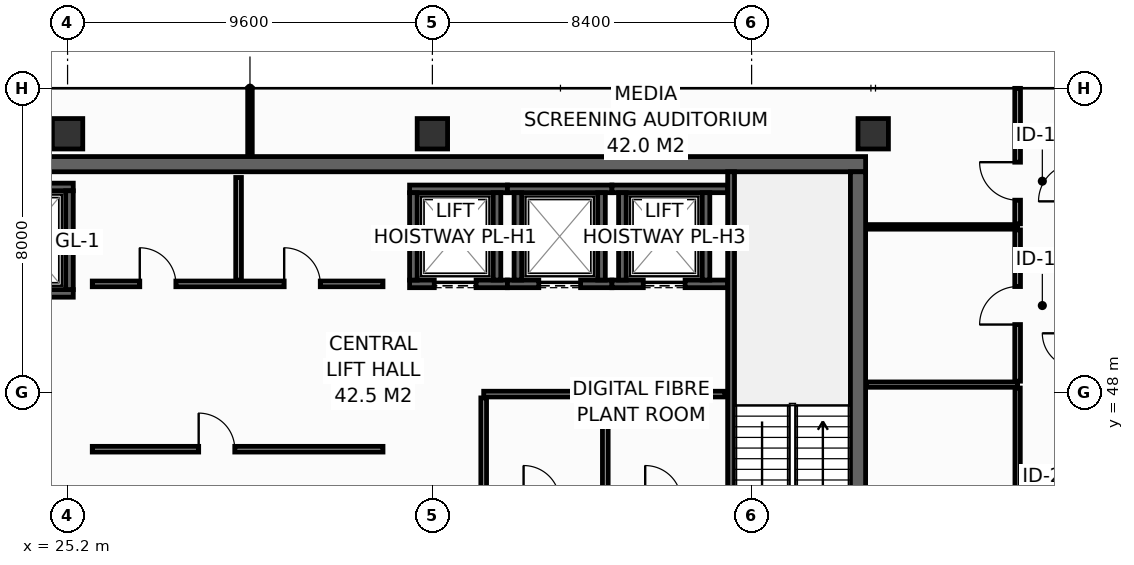
"""IFC4 building model, lengths in metres.
Left out: names, types, materials, properties, quantities, classifications, styles, units other than length and angle.
Written with IfcOpenShell. Run it as: python <this file> out.ifc"""

import sys

from ifc_helpers import new_model, si_unit, direction, frame, frame_2d, origin, origin_2d, place, context, subcontext, project, spatial, rectangle, hollow_rectangle, extrude, element, fill, save


model = new_model("IFC4")
c1 = context("Model", 3, precision=1e-05, world=origin(), true_north=direction((0.0, 1.0)))
c2 = subcontext(c1, "Body", "Model", "MODEL_VIEW")
j1 = project(units=[si_unit("LENGTHUNIT", "METRE"), si_unit("PLANEANGLEUNIT", "RADIAN")], contexts=[c1])
p1 = place(None, origin())
s1 = spatial("IfcSite", under=j1, at=p1, CompositionType="ELEMENT")
p2 = place(p1, origin())
s2 = spatial("IfcBuilding", under=s1, at=p2, CompositionType="ELEMENT")
p3 = place(p2, frame((0.0, 0.0, 230.6)))
s3 = spatial("IfcBuildingStorey", under=s2, at=p3, CompositionType="ELEMENT", Elevation=230.6)
p4 = place(p3, frame((13.7, 54.0, 0.0), z_axis=(0.0, 0.0, 1.0), x_axis=(1.0, 0.0, 0.0)))
e1 = element("IfcWall", 1, at=p4, inside=s3, PredefinedType="SHEAR", context=c2, shape_type="SweptSolid", body=[
    extrude(rectangle(XDim=32.5, YDim=0.4, at=frame_2d((16.25, 0.0))), origin(), (0.0, 0.0, 1.0), 3.55),
])
p5 = place(p3, frame((46.0, 43.4, 0.0), z_axis=(0.0, 0.0, 1.0), x_axis=(0.0, 1.0, 0.0)))
e2 = element("IfcWall", 2, at=p5, inside=s3, PredefinedType="SHEAR", context=c2, shape_type="SweptSolid", body=[
    extrude(rectangle(XDim=10.4, YDim=0.4, at=frame_2d((5.2, 0.0))), origin(), (0.0, 0.0, 1.0), 3.55),
])
for number, where, z_axis, x_axis in (
    (3, (25.2, 54.8, 0.0), (0.0, 0.0, 1.0), (1.0, 0.0, 0.0)),
    (4, (34.8, 54.8, 0.0), (0.0, 0.0, 1.0), (1.0, 0.0, 0.0)),
    (5, (46.4, 54.8, 0.0), (0.0, 0.0, 1.0), (1.0, 0.0, 0.0)),
):
    element("IfcColumn", number, at=place(p3, frame(where, z_axis=z_axis, x_axis=x_axis)), inside=s3, PredefinedType="COLUMN", context=c2, shape_type="SweptSolid", body=[
        extrude(hollow_rectangle(XDim=0.8, YDim=0.8, WallThickness=0.036, at=origin_2d()), origin(), (0.0, 0.0, 1.0), 3.8),
    ])
p6 = place(p3, frame((22.5, 50.6, 0.0), z_axis=(0.0, 0.0, 1.0), x_axis=(1.0, 0.0, 0.0)))
e6 = element("IfcWall", 6, at=p6, inside=s3, PredefinedType="SHEAR", context=c2, shape_type="SweptSolid", body=[
    extrude(rectangle(XDim=2.85, YDim=0.2, at=frame_2d((1.425, 0.0))), origin(), (0.0, 0.0, 1.0), 3.55),
])
p7 = place(p6, frame((0.925, 0.0, 0.0)))
e7 = element("IfcOpeningElement", 7, at=p7, cuts=e6, PredefinedType="OPENING", context=c2, shape_type="SweptSolid", body=[
    extrude(rectangle(XDim=1.25, YDim=2.3, at=frame_2d((0.625, 1.15))), frame((0.0, 0.11, 0.0), z_axis=(0.0, -1.0, 0.0), x_axis=(1.0, 0.0, 0.0)), (0.0, 0.0, 1.0), 0.22),
])
p8 = place(p3, frame((22.5, 53.4, 0.0), z_axis=(0.0, 0.0, 1.0), x_axis=(1.0, 0.0, 0.0)))
e8 = element("IfcWall", 8, at=p8, inside=s3, PredefinedType="SHEAR", context=c2, shape_type="SweptSolid", body=[
    extrude(rectangle(XDim=2.85, YDim=0.2, at=frame_2d((1.425, 0.0))), origin(), (0.0, 0.0, 1.0), 3.55),
])
p9 = place(p3, frame((25.25, 50.7, 0.0), z_axis=(0.0, 0.0, 1.0), x_axis=(0.0, 1.0, 0.0)))
e9 = element("IfcWall", 9, at=p9, inside=s3, PredefinedType="SHEAR", context=c2, shape_type="SweptSolid", body=[
    extrude(rectangle(XDim=2.6, YDim=0.2, at=frame_2d((1.3, 0.0))), origin(), (0.0, 0.0, 1.0), 3.55),
])
p10 = place(p3, frame((34.2, 50.85, 0.0), z_axis=(0.0, 0.0, 1.0), x_axis=(1.0, 0.0, 0.0)))
e10 = element("IfcWall", 10, at=p10, inside=s3, PredefinedType="SHEAR", context=c2, shape_type="SweptSolid", body=[
    extrude(rectangle(XDim=2.575, YDim=0.2, at=frame_2d((1.288, 0.0))), origin(), (0.0, 0.0, 1.0), 3.55),
])
p11 = place(p10, frame((0.65, 0.0, 0.0)))
e11 = element("IfcOpeningElement", 11, at=p11, cuts=e10, PredefinedType="OPENING", context=c2, shape_type="SweptSolid", body=[
    extrude(rectangle(XDim=1.1, YDim=2.2, at=frame_2d((0.55, 1.1))), frame((0.0, 0.11, 0.0), z_axis=(0.0, -1.0, 0.0), x_axis=(1.0, 0.0, 0.0)), (0.0, 0.0, 1.0), 0.22),
])
p12 = place(p3, frame((34.2, 53.35, 0.0), z_axis=(0.0, 0.0, 1.0), x_axis=(1.0, 0.0, 0.0)))
e12 = element("IfcWall", 12, at=p12, inside=s3, PredefinedType="SHEAR", context=c2, shape_type="SweptSolid", body=[
    extrude(rectangle(XDim=2.575, YDim=0.2, at=frame_2d((1.288, 0.0))), origin(), (0.0, 0.0, 1.0), 3.55),
])
for number, where, z_axis, x_axis in (
    (13, (34.3, 50.95, 0.0), (0.0, 0.0, 1.0), (0.0, 1.0, 0.0)),
    (14, (36.5, 50.95, 0.0), (0.0, 0.0, 1.0), (0.0, 1.0, 0.0)),
):
    element("IfcWall", number, at=place(p3, frame(where, z_axis=z_axis, x_axis=x_axis)), inside=s3, PredefinedType="SHEAR", context=c2, shape_type="SweptSolid", body=[
        extrude(rectangle(XDim=2.3, YDim=0.2, at=frame_2d((1.15, 0.0))), origin(), (0.0, 0.0, 1.0), 3.55),
    ])
p13 = place(p3, frame((36.775, 50.85, 0.0), z_axis=(0.0, 0.0, 1.0), x_axis=(1.0, 0.0, 0.0)))
e15 = element("IfcWall", 15, at=p13, inside=s3, PredefinedType="SHEAR", context=c2, shape_type="SweptSolid", body=[
    extrude(rectangle(XDim=2.75, YDim=0.2, at=frame_2d((1.375, 0.0))), origin(), (0.0, 0.0, 1.0), 3.55),
])
p14 = place(p13, frame((0.825, 0.0, 0.0)))
e16 = element("IfcOpeningElement", 16, at=p14, cuts=e15, PredefinedType="OPENING", context=c2, shape_type="SweptSolid", body=[
    extrude(rectangle(XDim=1.1, YDim=2.2, at=frame_2d((0.55, 1.1))), frame((0.0, 0.11, 0.0), z_axis=(0.0, -1.0, 0.0), x_axis=(1.0, 0.0, 0.0)), (0.0, 0.0, 1.0), 0.22),
])
p15 = place(p3, frame((36.775, 53.35, 0.0), z_axis=(0.0, 0.0, 1.0), x_axis=(1.0, 0.0, 0.0)))
e17 = element("IfcWall", 17, at=p15, inside=s3, PredefinedType="SHEAR", context=c2, shape_type="SweptSolid", body=[
    extrude(rectangle(XDim=2.75, YDim=0.2, at=frame_2d((1.375, 0.0))), origin(), (0.0, 0.0, 1.0), 3.55),
])
for number, where, z_axis, x_axis in (
    (18, (37.05, 50.95, 0.0), (0.0, 0.0, 1.0), (0.0, 1.0, 0.0)),
    (19, (39.25, 50.95, 0.0), (0.0, 0.0, 1.0), (0.0, 1.0, 0.0)),
):
    element("IfcWall", number, at=place(p3, frame(where, z_axis=z_axis, x_axis=x_axis)), inside=s3, PredefinedType="SHEAR", context=c2, shape_type="SweptSolid", body=[
        extrude(rectangle(XDim=2.3, YDim=0.2, at=frame_2d((1.15, 0.0))), origin(), (0.0, 0.0, 1.0), 3.55),
    ])
p16 = place(p3, frame((39.525, 50.85, 0.0), z_axis=(0.0, 0.0, 1.0), x_axis=(1.0, 0.0, 0.0)))
e20 = element("IfcWall", 20, at=p16, inside=s3, PredefinedType="SHEAR", context=c2, shape_type="SweptSolid", body=[
    extrude(rectangle(XDim=3.045, YDim=0.2, at=frame_2d((1.522, 0.0))), origin(), (0.0, 0.0, 1.0), 3.55),
])
p17 = place(p16, frame((0.825, 0.0, 0.0)))
e21 = element("IfcOpeningElement", 21, at=p17, cuts=e20, PredefinedType="OPENING", context=c2, shape_type="SweptSolid", body=[
    extrude(rectangle(XDim=1.1, YDim=2.2, at=frame_2d((0.55, 1.1))), frame((0.0, 0.11, 0.0), z_axis=(0.0, -1.0, 0.0), x_axis=(1.0, 0.0, 0.0)), (0.0, 0.0, 1.0), 0.22),
])
p18 = place(p3, frame((39.525, 53.35, 0.0), z_axis=(0.0, 0.0, 1.0), x_axis=(1.0, 0.0, 0.0)))
e22 = element("IfcWall", 22, at=p18, inside=s3, PredefinedType="SHEAR", context=c2, shape_type="SweptSolid", body=[
    extrude(rectangle(XDim=3.045, YDim=0.2, at=frame_2d((1.522, 0.0))), origin(), (0.0, 0.0, 1.0), 3.55),
])
for number, where, z_axis, x_axis in (
    (23, (39.8, 50.95, 0.0), (0.0, 0.0, 1.0), (0.0, 1.0, 0.0)),
    (24, (42.0, 50.95, 0.0), (0.0, 0.0, 1.0), (0.0, 1.0, 0.0)),
):
    element("IfcWall", number, at=place(p3, frame(where, z_axis=z_axis, x_axis=x_axis)), inside=s3, PredefinedType="SHEAR", context=c2, shape_type="SweptSolid", body=[
        extrude(rectangle(XDim=2.3, YDim=0.2, at=frame_2d((1.15, 0.0))), origin(), (0.0, 0.0, 1.0), 3.55),
    ])
p19 = place(p3, frame((42.66, 53.8, 0.0), z_axis=(0.0, 0.0, 1.0), x_axis=(0.0, -1.0, 0.0)))
e25 = element("IfcWall", 25, at=p19, inside=s3, PredefinedType="SHEAR", context=c2, shape_type="SweptSolid", body=[
    extrude(rectangle(XDim=10.4, YDim=0.18, at=frame_2d((5.2, 0.0))), origin(), (0.0, 0.0, 1.0), 3.55),
])
p20 = place(p19, frame((8.99, 0.0, 0.0)))
e26 = element("IfcOpeningElement", 26, at=p20, cuts=e25, PredefinedType="OPENING", context=c2, shape_type="SweptSolid", body=[
    extrude(rectangle(XDim=1.1, YDim=2.15, at=frame_2d((0.55, 1.075))), frame((0.0, 0.1, 0.0), z_axis=(0.0, -1.0, 0.0), x_axis=(1.0, 0.0, 0.0)), (0.0, 0.0, 1.0), 0.2),
])
p21 = place(p3, frame((36.15, 47.95, 0.0), z_axis=(0.0, 0.0, 1.0), x_axis=(1.0, 0.0, 0.0)))
e27 = element("IfcWall", 27, at=p21, inside=s3, PredefinedType="PARTITIONING", context=c2, shape_type="SweptSolid", body=[
    extrude(rectangle(XDim=6.35, YDim=0.15, at=frame_2d((3.175, 0.0))), origin(), (0.0, 0.0, 1.0), 3.55),
])
for number, where, z_axis, x_axis in (
    (28, (36.15, 45.22, 0.0), (0.0, 0.0, 1.0), (0.0, 1.0, 0.0)),
    (29, (39.35, 45.22, 0.0), (0.0, 0.0, 1.0), (0.0, 1.0, 0.0)),
):
    element("IfcWall", number, at=place(p3, frame(where, z_axis=z_axis, x_axis=x_axis)), inside=s3, PredefinedType="PARTITIONING", context=c2, shape_type="SweptSolid", body=[
        extrude(rectangle(XDim=2.63, YDim=0.15, at=frame_2d((1.315, 0.0))), origin(), (0.0, 0.0, 1.0), 3.55),
    ])
p22 = place(p3, frame((25.85, 50.85, 0.0), z_axis=(0.0, 0.0, 1.0), x_axis=(1.0, 0.0, 0.0)))
e30 = element("IfcWall", 30, at=p22, inside=s3, PredefinedType="PARTITIONING", context=c2, shape_type="SweptSolid", body=[
    extrude(rectangle(XDim=7.65, YDim=0.15, at=frame_2d((3.825, 0.0))), origin(), (0.0, 0.0, 1.0), 3.55),
])
p23 = place(p22, frame((1.25, 0.0, 0.0)))
e31 = element("IfcOpeningElement", 31, at=p23, cuts=e30, PredefinedType="OPENING", context=c2, shape_type="SweptSolid", body=[
    extrude(rectangle(XDim=0.95, YDim=2.15, at=frame_2d((0.475, 1.075))), frame((0.0, 0.085, 0.0), z_axis=(0.0, -1.0, 0.0), x_axis=(1.0, 0.0, 0.0)), (0.0, 0.0, 1.0), 0.17),
])
p24 = place(p22, frame((5.05, 0.0, 0.0)))
e32 = element("IfcOpeningElement", 32, at=p24, cuts=e30, PredefinedType="OPENING", context=c2, shape_type="SweptSolid", body=[
    extrude(rectangle(XDim=0.95, YDim=2.15, at=frame_2d((0.475, 1.075))), frame((0.0, 0.085, 0.0), z_axis=(0.0, -1.0, 0.0), x_axis=(1.0, 0.0, 0.0)), (0.0, 0.0, 1.0), 0.17),
])
p25 = place(p3, frame((29.7, 50.95, 0.0), z_axis=(0.0, 0.0, 1.0), x_axis=(0.0, 1.0, 0.0)))
e33 = element("IfcWall", 33, at=p25, inside=s3, PredefinedType="PARTITIONING", context=c2, shape_type="SweptSolid", body=[
    extrude(rectangle(XDim=2.7, YDim=0.15, at=frame_2d((1.35, 0.0))), origin(), (0.0, 0.0, 1.0), 3.55),
])
p26 = place(p3, frame((25.85, 46.5, 0.0), z_axis=(0.0, 0.0, 1.0), x_axis=(1.0, 0.0, 0.0)))
e34 = element("IfcWall", 34, at=p26, inside=s3, PredefinedType="PARTITIONING", context=c2, shape_type="SweptSolid", body=[
    extrude(rectangle(XDim=7.65, YDim=0.15, at=frame_2d((3.825, 0.0))), origin(), (0.0, 0.0, 1.0), 3.55),
])
p27 = place(p26, frame((2.8, 0.0, 0.0)))
e35 = element("IfcOpeningElement", 35, at=p27, cuts=e34, PredefinedType="OPENING", context=c2, shape_type="SweptSolid", body=[
    extrude(rectangle(XDim=0.95, YDim=2.15, at=frame_2d((0.475, 1.075))), frame((0.0, 0.085, 0.0), z_axis=(0.0, -1.0, 0.0), x_axis=(1.0, 0.0, 0.0)), (0.0, 0.0, 1.0), 0.17),
])
p28 = place(p3, frame((46.22, 48.2, 0.0), z_axis=(0.0, 0.0, 1.0), x_axis=(1.0, 0.0, 0.0)))
e36 = element("IfcWall", 36, at=p28, inside=s3, PredefinedType="PARTITIONING", context=c2, shape_type="SweptSolid", body=[
    extrude(rectangle(XDim=3.98, YDim=0.14, at=frame_2d((1.99, 0.0))), origin(), (0.0, 0.0, 1.0), 3.55),
])
p29 = place(p3, frame((50.2, 41.04, 0.0), z_axis=(0.0, 0.0, 1.0), x_axis=(0.0, 1.0, 0.0)))
e37 = element("IfcWall", 37, at=p29, inside=s3, PredefinedType="PARTITIONING", context=c2, shape_type="SweptSolid", body=[
    extrude(rectangle(XDim=7.07, YDim=0.14, at=frame_2d((3.535, 0.0))), origin(), (0.0, 0.0, 1.0), 2.947),
])
p30 = place(p29, frame((3.085, 0.0, 0.0)))
e38 = element("IfcOpeningElement", 38, at=p30, cuts=e37, PredefinedType="OPENING", context=c2, shape_type="SweptSolid", body=[
    extrude(rectangle(XDim=0.9, YDim=2.1, at=frame_2d((0.45, 1.05))), frame((0.0, 0.08, 0.0), z_axis=(0.0, -1.0, 0.0), x_axis=(1.0, 0.0, 0.0)), (0.0, 0.0, 1.0), 0.16),
])
p31 = place(p3, frame((46.22, 52.35, 0.0), z_axis=(0.0, 0.0, 1.0), x_axis=(1.0, 0.0, 0.0)))
e39 = element("IfcWall", 39, at=p31, inside=s3, PredefinedType="PARTITIONING", context=c2, shape_type="SweptSolid", body=[
    extrude(rectangle(XDim=3.98, YDim=0.12, at=frame_2d((1.99, 0.0))), origin(), (0.0, 0.0, 1.0), 3.55),
])
p32 = place(p3, frame((30.0, 54.22, 0.0), z_axis=(0.0, 0.0, 1.0), x_axis=(0.0, 1.0, 0.0)))
e40 = element("IfcWall", 40, at=p32, inside=s3, PredefinedType="PARTITIONING", context=c2, shape_type="SweptSolid", body=[
    extrude(rectangle(XDim=1.775, YDim=0.12, at=frame_2d((0.888, 0.0))), origin(), (0.0, 0.0, 1.0), 2.935),
])
p33 = place(p3, frame((50.2, 48.29, 0.0), z_axis=(0.0, 0.0, 1.0), x_axis=(0.0, 1.0, 0.0)))
e41 = element("IfcWall", 41, at=p33, inside=s3, PredefinedType="PARTITIONING", context=c2, shape_type="SweptSolid", body=[
    extrude(rectangle(XDim=3.98, YDim=0.15, at=frame_2d((1.99, 0.0))), origin(), (0.0, 0.0, 1.0), 3.55),
])
p34 = place(p33, frame((1.49, 0.0, 0.0)))
e42 = element("IfcOpeningElement", 42, at=p34, cuts=e41, PredefinedType="OPENING", context=c2, shape_type="SweptSolid", body=[
    extrude(rectangle(XDim=1.0, YDim=2.15, at=frame_2d((0.5, 1.075))), frame((0.0, 0.085, 0.0), z_axis=(0.0, -1.0, 0.0), x_axis=(1.0, 0.0, 0.0)), (0.0, 0.0, 1.0), 0.17),
])
p35 = place(p3, frame((50.2, 52.43, 0.0), z_axis=(0.0, 0.0, 1.0), x_axis=(0.0, 1.0, 0.0)))
e43 = element("IfcWall", 43, at=p35, inside=s3, PredefinedType="PARTITIONING", context=c2, shape_type="SweptSolid", body=[
    extrude(rectangle(XDim=3.565, YDim=0.15, at=frame_2d((1.783, 0.0))), origin(), (0.0, 0.0, 1.0), 2.935),
])
p36 = place(p35, frame((0.622, 0.0, 0.0)))
e44 = element("IfcOpeningElement", 44, at=p36, cuts=e43, PredefinedType="OPENING", context=c2, shape_type="SweptSolid", body=[
    extrude(rectangle(XDim=1.0, YDim=2.15, at=frame_2d((0.5, 1.075))), frame((0.0, 0.085, 0.0), z_axis=(0.0, -1.0, 0.0), x_axis=(1.0, 0.0, 0.0)), (0.0, 0.0, 1.0), 0.17),
])
p37 = place(p11, origin())
e45 = element("IfcDoor", 45, at=p37, inside=s3, OperationType="SLIDING_TO_LEFT", PredefinedType="DOOR", context=c2, shape_type="SweptSolid", body=[
    extrude(rectangle(XDim=1.1, YDim=2.2, at=frame_2d((0.55, 1.1))), frame((0.0, 0.025, 0.0), z_axis=(0.0, -1.0, 0.0), x_axis=(1.0, 0.0, 0.0)), (0.0, 0.0, 1.0), 0.05),
])
fill(e11, e45)
p38 = place(p14, origin())
e46 = element("IfcDoor", 46, at=p38, inside=s3, OperationType="SLIDING_TO_LEFT", PredefinedType="DOOR", context=c2, shape_type="SweptSolid", body=[
    extrude(rectangle(XDim=1.1, YDim=2.2, at=frame_2d((0.55, 1.1))), frame((0.0, 0.025, 0.0), z_axis=(0.0, -1.0, 0.0), x_axis=(1.0, 0.0, 0.0)), (0.0, 0.0, 1.0), 0.05),
])
fill(e16, e46)
p39 = place(p17, origin())
e47 = element("IfcDoor", 47, at=p39, inside=s3, OperationType="SLIDING_TO_LEFT", PredefinedType="DOOR", context=c2, shape_type="SweptSolid", body=[
    extrude(rectangle(XDim=1.1, YDim=2.2, at=frame_2d((0.55, 1.1))), frame((0.0, 0.025, 0.0), z_axis=(0.0, -1.0, 0.0), x_axis=(1.0, 0.0, 0.0)), (0.0, 0.0, 1.0), 0.05),
])
fill(e21, e47)
p40 = place(p23, origin())
e48 = element("IfcDoor", 48, at=p40, inside=s3, OperationType="SINGLE_SWING_LEFT", PredefinedType="DOOR", context=c2, shape_type="SweptSolid", body=[
    extrude(rectangle(XDim=0.95, YDim=2.15, at=frame_2d((0.475, 1.075))), frame((0.0, 0.025, 0.0), z_axis=(0.0, -1.0, 0.0), x_axis=(1.0, 0.0, 0.0)), (0.0, 0.0, 1.0), 0.05),
])
fill(e31, e48)
p41 = place(p24, origin())
e49 = element("IfcDoor", 49, at=p41, inside=s3, OperationType="SINGLE_SWING_LEFT", PredefinedType="DOOR", context=c2, shape_type="SweptSolid", body=[
    extrude(rectangle(XDim=0.95, YDim=2.15, at=frame_2d((0.475, 1.075))), frame((0.0, 0.025, 0.0), z_axis=(0.0, -1.0, 0.0), x_axis=(1.0, 0.0, 0.0)), (0.0, 0.0, 1.0), 0.05),
])
fill(e32, e49)
p42 = place(p27, origin())
e50 = element("IfcDoor", 50, at=p42, inside=s3, OperationType="SINGLE_SWING_LEFT", PredefinedType="DOOR", context=c2, shape_type="SweptSolid", body=[
    extrude(rectangle(XDim=0.95, YDim=2.15, at=frame_2d((0.475, 1.075))), frame((0.0, 0.025, 0.0), z_axis=(0.0, -1.0, 0.0), x_axis=(1.0, 0.0, 0.0)), (0.0, 0.0, 1.0), 0.05),
])
fill(e35, e50)
p43 = place(p34, origin())
e51 = element("IfcDoor", 51, at=p43, inside=s3, OperationType="SINGLE_SWING_LEFT", PredefinedType="DOOR", context=c2, shape_type="SweptSolid", body=[
    extrude(rectangle(XDim=1.0, YDim=2.15, at=frame_2d((0.5, 1.075))), frame((0.0, 0.025, 0.0), z_axis=(0.0, -1.0, 0.0), x_axis=(1.0, 0.0, 0.0)), (0.0, 0.0, 1.0), 0.05),
])
fill(e42, e51)
p44 = place(p36, origin())
e52 = element("IfcDoor", 52, at=p44, inside=s3, OperationType="SINGLE_SWING_RIGHT", PredefinedType="DOOR", context=c2, shape_type="SweptSolid", body=[
    extrude(rectangle(XDim=1.0, YDim=2.15, at=frame_2d((0.5, 1.075))), frame((0.0, 0.025, 0.0), z_axis=(0.0, -1.0, 0.0), x_axis=(1.0, 0.0, 0.0)), (0.0, 0.0, 1.0), 0.05),
])
fill(e44, e52)
save(model, sys.argv[1])
